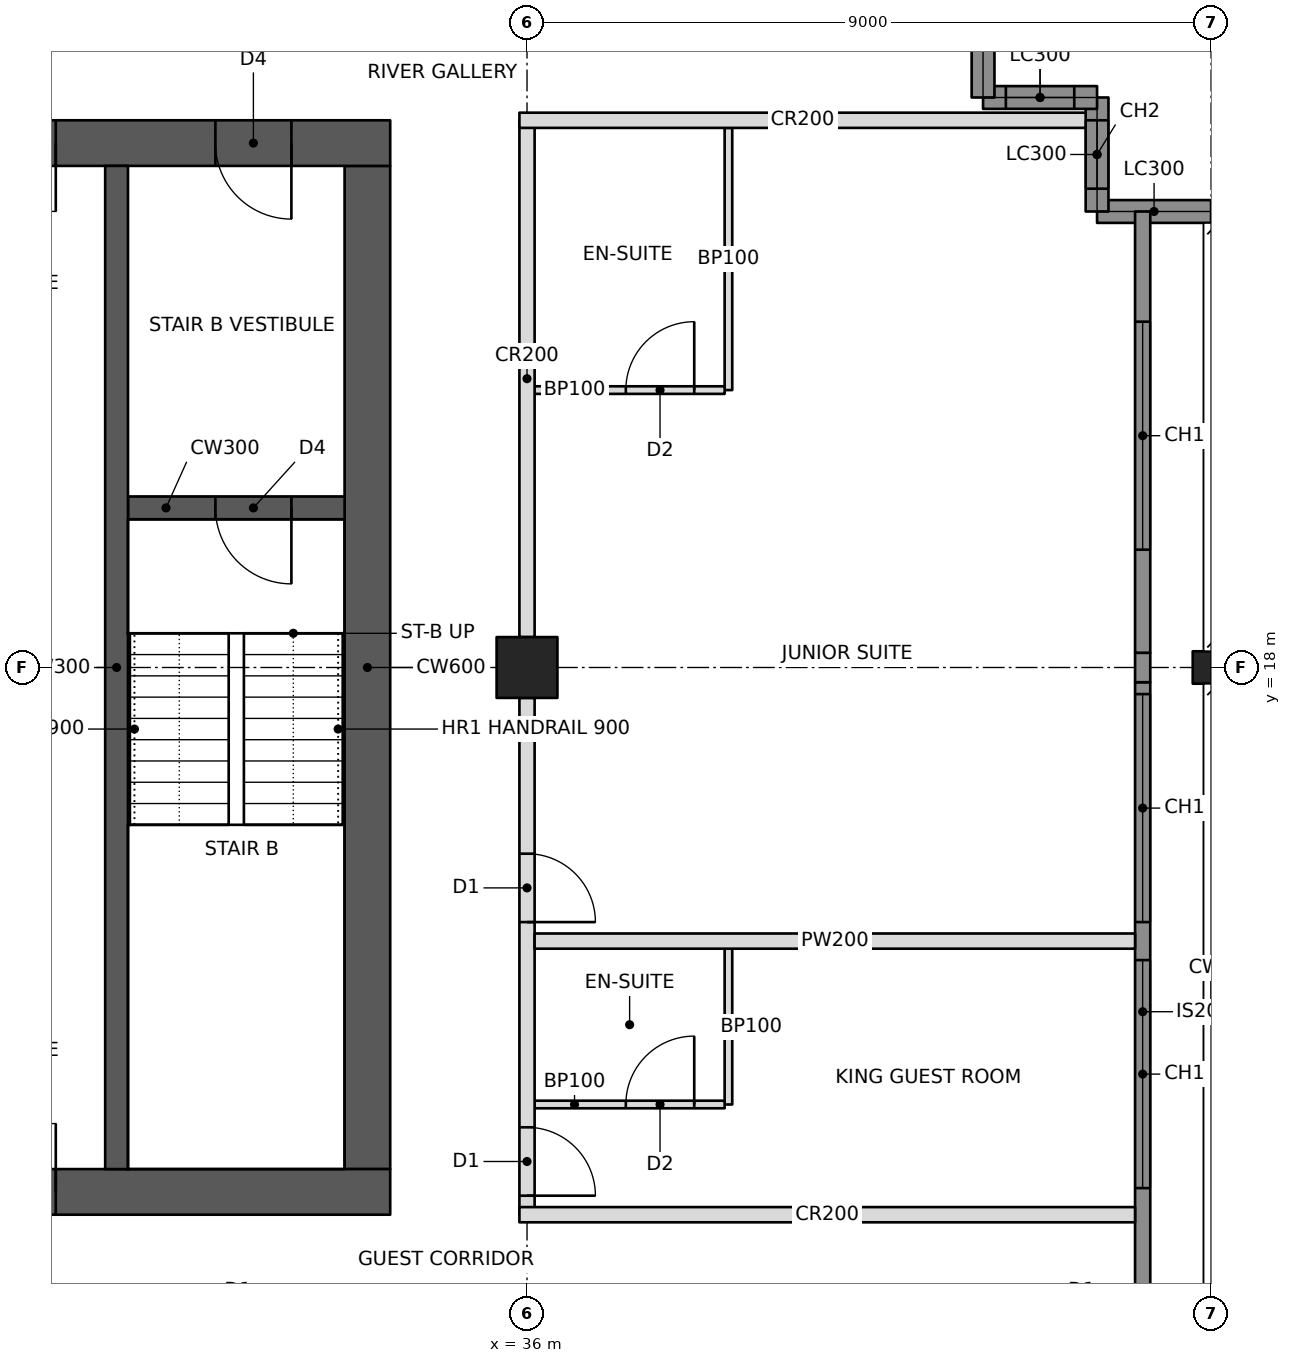
"""IFC4 building model, lengths in metres.
Left out: names, types, materials, properties, quantities, classifications, styles, units other than length and angle.
Written with IfcOpenShell. Run it as: python <this file> out.ifc"""

import sys

from ifc_helpers import new_model, si_unit, direction, frame, frame_2d, origin, origin_2d, place, context, subcontext, project, spatial, rectangle, hollow_rectangle, i_section, extrude, element, fill, save


model = new_model("IFC4")
c1 = context("Model", 3, precision=1e-05, world=origin(), true_north=direction((0.0, 1.0)))
c2 = subcontext(c1, "Body", "Model", "MODEL_VIEW")
j1 = project(units=[si_unit("LENGTHUNIT", "METRE"), si_unit("PLANEANGLEUNIT", "RADIAN")], contexts=[c1])
p1 = place(None, origin())
s1 = spatial("IfcSite", under=j1, at=p1, CompositionType="ELEMENT")
p2 = place(p1, origin())
s2 = spatial("IfcBuilding", under=s1, at=p2, CompositionType="ELEMENT")
p3 = place(p2, frame((0.0, 0.0, 204.6)))
s3 = spatial("IfcBuildingStorey", under=s2, at=p3, CompositionType="ELEMENT", Elevation=204.6)
p4 = place(p3, frame((36.0, 18.0, 0.0), z_axis=(0.0, 0.0, 1.0), x_axis=(0.0, 1.0, 0.0)))
e1 = element("IfcColumn", 1, at=p4, inside=s3, PredefinedType="COLUMN", context=c2, shape_type="SweptSolid", body=[
    extrude(hollow_rectangle(XDim=0.8, YDim=0.8, WallThickness=0.05, at=origin_2d()), origin(), (0.0, 0.0, 1.0), 3.4),
])
p5 = place(p3, frame((45.0, 18.0, 0.0), z_axis=(0.0, 0.0, 1.0), x_axis=(0.0, 1.0, 0.0)))
e2 = element("IfcColumn", 2, at=p5, inside=s3, PredefinedType="COLUMN", context=c2, shape_type="SweptSolid", body=[
    extrude(i_section(OverallWidth=0.427, OverallDepth=0.483, WebThickness=0.051, FlangeThickness=0.082, at=origin_2d()), origin(), (0.0, 0.0, 1.0), 3.4),
])
p6 = place(p3, frame((10.8, 11.1, 0.0), z_axis=(0.0, 0.0, 1.0), x_axis=(1.0, 0.0, 0.0)))
e3 = element("IfcWall", 3, at=p6, inside=s3, PredefinedType="SHEAR", context=c2, shape_type="SweptSolid", body=[
    extrude(rectangle(XDim=23.4, YDim=0.6, at=frame_2d((11.7, 0.0))), origin(), (0.0, 0.0, 1.0), 3.4),
])
p7 = place(p6, frame((1.0, 0.0, 0.0)))
e4 = element("IfcOpeningElement", 4, at=p7, cuts=e3, PredefinedType="OPENING", context=c2, shape_type="SweptSolid", body=[
    extrude(rectangle(XDim=1.0, YDim=2.1, at=frame_2d((0.5, 1.05))), frame((0.0, 0.31, 0.0), z_axis=(0.0, -1.0, 0.0), x_axis=(1.0, 0.0, 0.0)), (0.0, 0.0, 1.0), 0.62),
])
p8 = place(p6, frame((17.2, 0.0, 0.0)))
e5 = element("IfcOpeningElement", 5, at=p8, cuts=e3, PredefinedType="OPENING", context=c2, shape_type="SweptSolid", body=[
    extrude(rectangle(XDim=1.8, YDim=2.1, at=frame_2d((0.9, 1.05))), frame((0.0, 0.31, 0.0), z_axis=(0.0, -1.0, 0.0), x_axis=(1.0, 0.0, 0.0)), (0.0, 0.0, 1.0), 0.62),
])
p9 = place(p3, frame((10.8, 24.9, 0.0), z_axis=(0.0, 0.0, 1.0), x_axis=(1.0, 0.0, 0.0)))
e6 = element("IfcWall", 6, at=p9, inside=s3, PredefinedType="SHEAR", context=c2, shape_type="SweptSolid", body=[
    extrude(rectangle(XDim=23.4, YDim=0.6, at=frame_2d((11.7, 0.0))), origin(), (0.0, 0.0, 1.0), 3.4),
])
p10 = place(p9, frame((17.2, 0.0, 0.0)))
e7 = element("IfcOpeningElement", 7, at=p10, cuts=e6, PredefinedType="OPENING", context=c2, shape_type="SweptSolid", body=[
    extrude(rectangle(XDim=1.8, YDim=2.1, at=frame_2d((0.9, 1.05))), frame((0.0, 0.31, 0.0), z_axis=(0.0, -1.0, 0.0), x_axis=(1.0, 0.0, 0.0)), (0.0, 0.0, 1.0), 0.62),
])
p11 = place(p9, frame((21.1, 0.0, 0.0)))
e8 = element("IfcOpeningElement", 8, at=p11, cuts=e6, PredefinedType="OPENING", context=c2, shape_type="SweptSolid", body=[
    extrude(rectangle(XDim=1.0, YDim=2.1, at=frame_2d((0.5, 1.05))), frame((0.0, 0.31, 0.0), z_axis=(0.0, -1.0, 0.0), x_axis=(1.0, 0.0, 0.0)), (0.0, 0.0, 1.0), 0.62),
])
p12 = place(p9, frame((4.9, 0.0, 0.0)))
e9 = element("IfcOpeningElement", 9, at=p12, cuts=e6, PredefinedType="OPENING", context=c2, shape_type="SweptSolid", body=[
    extrude(rectangle(XDim=1.0, YDim=2.1, at=frame_2d((0.5, 1.05))), frame((0.0, 0.31, 0.0), z_axis=(0.0, -1.0, 0.0), x_axis=(1.0, 0.0, 0.0)), (0.0, 0.0, 1.0), 0.62),
])
p13 = place(p3, frame((33.9, 11.4, 0.0), z_axis=(0.0, 0.0, 1.0), x_axis=(0.0, 1.0, 0.0)))
e10 = element("IfcWall", 10, at=p13, inside=s3, PredefinedType="SHEAR", context=c2, shape_type="SweptSolid", body=[
    extrude(rectangle(XDim=13.2, YDim=0.6, at=frame_2d((6.6, 0.0))), origin(), (0.0, 0.0, 1.0), 3.4),
])
p14 = place(p3, frame((30.6, 11.4, 0.0), z_axis=(0.0, 0.0, 1.0), x_axis=(0.0, 1.0, 0.0)))
e11 = element("IfcWall", 11, at=p14, inside=s3, PredefinedType="SHEAR", context=c2, shape_type="SweptSolid", body=[
    extrude(rectangle(XDim=13.2, YDim=0.3, at=frame_2d((6.6, 0.0))), origin(), (0.0, 0.0, 1.0), 3.4),
])
p15 = place(p3, frame((30.75, 20.1, 0.0), z_axis=(0.0, 0.0, 1.0), x_axis=(1.0, 0.0, 0.0)))
e12 = element("IfcWall", 12, at=p15, inside=s3, PredefinedType="SHEAR", context=c2, shape_type="SweptSolid", body=[
    extrude(rectangle(XDim=2.85, YDim=0.3, at=frame_2d((1.425, 0.0))), origin(), (0.0, 0.0, 1.0), 3.4),
])
p16 = place(p15, frame((1.15, 0.0, 0.0)))
e13 = element("IfcOpeningElement", 13, at=p16, cuts=e12, PredefinedType="OPENING", context=c2, shape_type="SweptSolid", body=[
    extrude(rectangle(XDim=1.0, YDim=2.1, at=frame_2d((0.5, 1.05))), frame((0.0, 0.16, 0.0), z_axis=(0.0, -1.0, 0.0), x_axis=(1.0, 0.0, 0.0)), (0.0, 0.0, 1.0), 0.32),
])
p17 = place(p3, frame((45.0, 24.0, 0.0), z_axis=(0.0, 0.0, 1.0), x_axis=(-1.0, 0.0, 0.0)))
e14 = element("IfcWall", 14, at=p17, inside=s3, PredefinedType="SOLIDWALL", context=c2, shape_type="SweptSolid", body=[
    extrude(rectangle(XDim=1.5, YDim=0.3, at=frame_2d((0.75, 0.0))), origin(), (0.0, 0.0, 1.0), 2.42),
])
p18 = place(p3, frame((43.5, 24.0, 0.0), z_axis=(0.0, 0.0, 1.0), x_axis=(0.0, 1.0, 0.0)))
e15 = element("IfcWall", 15, at=p18, inside=s3, PredefinedType="SOLIDWALL", context=c2, shape_type="SweptSolid", body=[
    extrude(rectangle(XDim=1.5, YDim=0.3, at=frame_2d((0.75, 0.0))), origin(), (0.0, 0.0, 1.0), 3.2),
])
p19 = place(p18, frame((0.3, 0.0, 0.6)))
e16 = element("IfcOpeningElement", 16, at=p19, cuts=e15, PredefinedType="OPENING", context=c2, shape_type="SweptSolid", body=[
    extrude(rectangle(XDim=0.9, YDim=2.2, at=frame_2d((0.45, 1.1))), frame((0.0, 0.16, 0.0), z_axis=(0.0, -1.0, 0.0), x_axis=(1.0, 0.0, 0.0)), (0.0, 0.0, 1.0), 0.32),
])
p20 = place(p3, frame((43.5, 25.5, 0.0), z_axis=(0.0, 0.0, 1.0), x_axis=(-1.0, 0.0, 0.0)))
e17 = element("IfcWall", 17, at=p20, inside=s3, PredefinedType="SOLIDWALL", context=c2, shape_type="SweptSolid", body=[
    extrude(rectangle(XDim=1.5, YDim=0.3, at=frame_2d((0.75, 0.0))), origin(), (0.0, 0.0, 1.0), 3.2),
])
p21 = place(p20, frame((0.3, 0.0, 0.6)))
e18 = element("IfcOpeningElement", 18, at=p21, cuts=e17, PredefinedType="OPENING", context=c2, shape_type="SweptSolid", body=[
    extrude(rectangle(XDim=0.9, YDim=2.2, at=frame_2d((0.45, 1.1))), frame((0.0, 0.16, 0.0), z_axis=(0.0, -1.0, 0.0), x_axis=(1.0, 0.0, 0.0)), (0.0, 0.0, 1.0), 0.32),
])
p22 = place(p3, frame((42.0, 25.5, 0.0), z_axis=(0.0, 0.0, 1.0), x_axis=(0.0, 1.0, 0.0)))
e19 = element("IfcWall", 19, at=p22, inside=s3, PredefinedType="SOLIDWALL", context=c2, shape_type="SweptSolid", body=[
    extrude(rectangle(XDim=1.5, YDim=0.3, at=frame_2d((0.75, 0.0))), origin(), (0.0, 0.0, 1.0), 2.42),
])
p23 = place(p3, frame((36.0, 10.8, 0.0), z_axis=(0.0, 0.0, 1.0), x_axis=(0.0, 1.0, 0.0)))
e20 = element("IfcWall", 20, at=p23, inside=s3, PredefinedType="PARTITIONING", context=c2, shape_type="SweptSolid", body=[
    extrude(rectangle(XDim=6.8, YDim=0.2, at=frame_2d((3.4, 0.0))), origin(), (0.0, 0.0, 1.0), 2.405),
])
p24 = place(p23, frame((0.25, 0.0, 0.0)))
e21 = element("IfcOpeningElement", 21, at=p24, cuts=e20, PredefinedType="OPENING", context=c2, shape_type="SweptSolid", body=[
    extrude(rectangle(XDim=0.9, YDim=2.1, at=frame_2d((0.45, 1.05))), frame((0.0, 0.11, 0.0), z_axis=(0.0, -1.0, 0.0), x_axis=(1.0, 0.0, 0.0)), (0.0, 0.0, 1.0), 0.22),
])
p25 = place(p23, frame((3.85, 0.0, 0.0)))
e22 = element("IfcOpeningElement", 22, at=p25, cuts=e20, PredefinedType="OPENING", context=c2, shape_type="SweptSolid", body=[
    extrude(rectangle(XDim=0.9, YDim=2.1, at=frame_2d((0.45, 1.05))), frame((0.0, 0.11, 0.0), z_axis=(0.0, -1.0, 0.0), x_axis=(1.0, 0.0, 0.0)), (0.0, 0.0, 1.0), 0.22),
])
p26 = place(p3, frame((36.0, 18.4, 0.0), z_axis=(0.0, 0.0, 1.0), x_axis=(0.0, 1.0, 0.0)))
e23 = element("IfcWall", 23, at=p26, inside=s3, PredefinedType="PARTITIONING", context=c2, shape_type="SweptSolid", body=[
    extrude(rectangle(XDim=6.8, YDim=0.2, at=frame_2d((3.4, 0.0))), origin(), (0.0, 0.0, 1.0), 2.405),
])
p27 = place(p3, frame((35.9, 10.8, 0.0), z_axis=(0.0, 0.0, 1.0), x_axis=(1.0, 0.0, 0.0)))
e24 = element("IfcWall", 24, at=p27, inside=s3, PredefinedType="PARTITIONING", context=c2, shape_type="SweptSolid", body=[
    extrude(rectangle(XDim=8.1, YDim=0.2, at=frame_2d((4.05, 0.0))), origin(), (0.0, 0.0, 1.0), 2.404),
])
p28 = place(p3, frame((35.9, 25.2, 0.0), z_axis=(0.0, 0.0, 1.0), x_axis=(1.0, 0.0, 0.0)))
e25 = element("IfcWall", 25, at=p28, inside=s3, PredefinedType="PARTITIONING", context=c2, shape_type="SweptSolid", body=[
    extrude(rectangle(XDim=7.45, YDim=0.2, at=frame_2d((3.725, 0.0))), origin(), (0.0, 0.0, 1.0), 2.404),
])
p29 = place(p3, frame((36.1, 14.4, 0.0), z_axis=(0.0, 0.0, 1.0), x_axis=(1.0, 0.0, 0.0)))
e26 = element("IfcWall", 26, at=p29, inside=s3, PredefinedType="PARTITIONING", context=c2, shape_type="SweptSolid", body=[
    extrude(rectangle(XDim=7.9, YDim=0.2, at=frame_2d((3.95, 0.0))), origin(), (0.0, 0.0, 1.0), 2.404),
])
p30 = place(p3, frame((38.65, 12.25, 0.0), z_axis=(0.0, 0.0, 1.0), x_axis=(0.0, 1.0, 0.0)))
e27 = element("IfcWall", 27, at=p30, inside=s3, PredefinedType="PARTITIONING", context=c2, shape_type="SweptSolid", body=[
    extrude(rectangle(XDim=2.05, YDim=0.1, at=frame_2d((1.025, 0.0))), origin(), (0.0, 0.0, 1.0), 3.2),
])
p31 = place(p3, frame((36.1, 12.25, 0.0), z_axis=(0.0, 0.0, 1.0), x_axis=(1.0, 0.0, 0.0)))
e28 = element("IfcWall", 28, at=p31, inside=s3, PredefinedType="PARTITIONING", context=c2, shape_type="SweptSolid", body=[
    extrude(rectangle(XDim=2.5, YDim=0.1, at=frame_2d((1.25, 0.0))), origin(), (0.0, 0.0, 1.0), 2.404),
])
p32 = place(p31, frame((1.2, 0.0, 0.0)))
e29 = element("IfcOpeningElement", 29, at=p32, cuts=e28, PredefinedType="OPENING", context=c2, shape_type="SweptSolid", body=[
    extrude(rectangle(XDim=0.9, YDim=2.1, at=frame_2d((0.45, 1.05))), frame((0.0, 0.06, 0.0), z_axis=(0.0, -1.0, 0.0), x_axis=(1.0, 0.0, 0.0)), (0.0, 0.0, 1.0), 0.12),
])
p33 = place(p3, frame((38.65, 21.65, 0.0), z_axis=(0.0, 0.0, 1.0), x_axis=(0.0, 1.0, 0.0)))
e30 = element("IfcWall", 30, at=p33, inside=s3, PredefinedType="PARTITIONING", context=c2, shape_type="SweptSolid", body=[
    extrude(rectangle(XDim=3.45, YDim=0.1, at=frame_2d((1.725, 0.0))), origin(), (0.0, 0.0, 1.0), 3.2),
])
p34 = place(p3, frame((36.1, 21.65, 0.0), z_axis=(0.0, 0.0, 1.0), x_axis=(1.0, 0.0, 0.0)))
e31 = element("IfcWall", 31, at=p34, inside=s3, PredefinedType="PARTITIONING", context=c2, shape_type="SweptSolid", body=[
    extrude(rectangle(XDim=2.5, YDim=0.1, at=frame_2d((1.25, 0.0))), origin(), (0.0, 0.0, 1.0), 2.404),
])
p35 = place(p34, frame((1.2, 0.0, 0.0)))
e32 = element("IfcOpeningElement", 32, at=p35, cuts=e31, PredefinedType="OPENING", context=c2, shape_type="SweptSolid", body=[
    extrude(rectangle(XDim=0.9, YDim=2.1, at=frame_2d((0.45, 1.05))), frame((0.0, 0.06, 0.0), z_axis=(0.0, -1.0, 0.0), x_axis=(1.0, 0.0, 0.0)), (0.0, 0.0, 1.0), 0.12),
])
p36 = place(p3, frame((44.1, 9.135, 0.0), z_axis=(0.0, 0.0, 1.0), x_axis=(0.0, 1.0, 0.0)))
e33 = element("IfcWall", 33, at=p36, inside=s3, PredefinedType="SOLIDWALL", context=c2, shape_type="SweptSolid", body=[
    extrude(rectangle(XDim=8.671, YDim=0.2, at=frame_2d((4.335, 0.0))), origin(), (0.0, 0.0, 1.0), 3.2),
])
p37 = place(p36, frame((2.015, 0.0, 0.6)))
e34 = element("IfcOpeningElement", 34, at=p37, cuts=e33, PredefinedType="OPENING", context=c2, shape_type="SweptSolid", body=[
    extrude(rectangle(XDim=3.0, YDim=2.2, at=frame_2d((1.5, 1.1))), frame((0.0, 0.11, 0.0), z_axis=(0.0, -1.0, 0.0), x_axis=(1.0, 0.0, 0.0)), (0.0, 0.0, 1.0), 0.22),
])
p38 = place(p36, frame((5.515, 0.0, 0.6)))
e35 = element("IfcOpeningElement", 35, at=p38, cuts=e33, PredefinedType="OPENING", context=c2, shape_type="SweptSolid", body=[
    extrude(rectangle(XDim=3.0, YDim=2.2, at=frame_2d((1.5, 1.1))), frame((0.0, 0.11, 0.0), z_axis=(0.0, -1.0, 0.0), x_axis=(1.0, 0.0, 0.0)), (0.0, 0.0, 1.0), 0.22),
])
p39 = place(p3, frame((44.1, 17.806, 0.0), z_axis=(0.0, 0.0, 1.0), x_axis=(0.0, 1.0, 0.0)))
e36 = element("IfcWall", 36, at=p39, inside=s3, PredefinedType="SOLIDWALL", context=c2, shape_type="SweptSolid", body=[
    extrude(rectangle(XDim=0.388, YDim=0.2, at=frame_2d((0.194, 0.0))), origin(), (0.0, 0.0, 1.0), 2.404),
])
p40 = place(p3, frame((44.1, 18.194, 0.0), z_axis=(0.0, 0.0, 1.0), x_axis=(0.0, 1.0, 0.0)))
e37 = element("IfcWall", 37, at=p40, inside=s3, PredefinedType="SOLIDWALL", context=c2, shape_type="SweptSolid", body=[
    extrude(rectangle(XDim=5.806, YDim=0.2, at=frame_2d((2.903, 0.0))), origin(), (0.0, 0.0, 1.0), 3.2),
])
p41 = place(p40, frame((1.356, 0.0, 0.6)))
e38 = element("IfcOpeningElement", 38, at=p41, cuts=e37, PredefinedType="OPENING", context=c2, shape_type="SweptSolid", body=[
    extrude(rectangle(XDim=3.0, YDim=2.2, at=frame_2d((1.5, 1.1))), frame((0.0, 0.11, 0.0), z_axis=(0.0, -1.0, 0.0), x_axis=(1.0, 0.0, 0.0)), (0.0, 0.0, 1.0), 0.22),
])
p42 = place(p19, origin())
e39 = element("IfcWindow", 39, at=p42, inside=s3, PartitioningType="SINGLE_PANEL", PredefinedType="WINDOW", context=c2, shape_type="SweptSolid", body=[
    extrude(rectangle(XDim=0.9, YDim=2.2, at=frame_2d((0.45, 1.1))), frame((0.0, 0.03, 0.0), z_axis=(0.0, -1.0, 0.0), x_axis=(1.0, 0.0, 0.0)), (0.0, 0.0, 1.0), 0.06),
])
fill(e16, e39)
p43 = place(p21, origin())
e40 = element("IfcWindow", 40, at=p43, inside=s3, PartitioningType="SINGLE_PANEL", PredefinedType="WINDOW", context=c2, shape_type="SweptSolid", body=[
    extrude(rectangle(XDim=0.9, YDim=2.2, at=frame_2d((0.45, 1.1))), frame((0.0, 0.03, 0.0), z_axis=(0.0, -1.0, 0.0), x_axis=(1.0, 0.0, 0.0)), (0.0, 0.0, 1.0), 0.06),
])
fill(e18, e40)
p44 = place(p37, origin())
e41 = element("IfcWindow", 41, at=p44, inside=s3, PartitioningType="TRIPLE_PANEL_VERTICAL", PredefinedType="WINDOW", context=c2, shape_type="SweptSolid", body=[
    extrude(rectangle(XDim=3.0, YDim=2.2, at=frame_2d((1.5, 1.1))), frame((0.0, 0.03, 0.0), z_axis=(0.0, -1.0, 0.0), x_axis=(1.0, 0.0, 0.0)), (0.0, 0.0, 1.0), 0.06),
])
fill(e34, e41)
p45 = place(p38, origin())
e42 = element("IfcWindow", 42, at=p45, inside=s3, PartitioningType="TRIPLE_PANEL_VERTICAL", PredefinedType="WINDOW", context=c2, shape_type="SweptSolid", body=[
    extrude(rectangle(XDim=3.0, YDim=2.2, at=frame_2d((1.5, 1.1))), frame((0.0, 0.03, 0.0), z_axis=(0.0, -1.0, 0.0), x_axis=(1.0, 0.0, 0.0)), (0.0, 0.0, 1.0), 0.06),
])
fill(e35, e42)
p46 = place(p41, origin())
e43 = element("IfcWindow", 43, at=p46, inside=s3, PartitioningType="TRIPLE_PANEL_VERTICAL", PredefinedType="WINDOW", context=c2, shape_type="SweptSolid", body=[
    extrude(rectangle(XDim=3.0, YDim=2.2, at=frame_2d((1.5, 1.1))), frame((0.0, 0.03, 0.0), z_axis=(0.0, -1.0, 0.0), x_axis=(1.0, 0.0, 0.0)), (0.0, 0.0, 1.0), 0.06),
])
fill(e38, e43)
p47 = place(p32, origin())
e44 = element("IfcDoor", 44, at=p47, inside=s3, OperationType="SINGLE_SWING_RIGHT", PredefinedType="DOOR", context=c2, shape_type="SweptSolid", body=[
    extrude(rectangle(XDim=0.9, YDim=2.1, at=frame_2d((0.45, 1.05))), frame((0.0, 0.025, 0.0), z_axis=(0.0, -1.0, 0.0), x_axis=(1.0, 0.0, 0.0)), (0.0, 0.0, 1.0), 0.05),
])
fill(e29, e44)
p48 = place(p24, frame((0.9, 0.0, 0.0), z_axis=(0.0, 0.0, 1.0), x_axis=(-1.0, 0.0, 0.0)))
e45 = element("IfcDoor", 45, at=p48, inside=s3, OperationType="SINGLE_SWING_RIGHT", PredefinedType="DOOR", context=c2, shape_type="SweptSolid", body=[
    extrude(rectangle(XDim=0.9, YDim=2.1, at=frame_2d((0.45, 1.05))), frame((0.0, 0.025, 0.0), z_axis=(0.0, -1.0, 0.0), x_axis=(1.0, 0.0, 0.0)), (0.0, 0.0, 1.0), 0.05),
])
fill(e21, e45)
p49 = place(p35, origin())
e46 = element("IfcDoor", 46, at=p49, inside=s3, OperationType="SINGLE_SWING_RIGHT", PredefinedType="DOOR", context=c2, shape_type="SweptSolid", body=[
    extrude(rectangle(XDim=0.9, YDim=2.1, at=frame_2d((0.45, 1.05))), frame((0.0, 0.025, 0.0), z_axis=(0.0, -1.0, 0.0), x_axis=(1.0, 0.0, 0.0)), (0.0, 0.0, 1.0), 0.05),
])
fill(e32, e46)
p50 = place(p25, frame((0.9, 0.0, 0.0), z_axis=(0.0, 0.0, 1.0), x_axis=(-1.0, 0.0, 0.0)))
e47 = element("IfcDoor", 47, at=p50, inside=s3, OperationType="SINGLE_SWING_RIGHT", PredefinedType="DOOR", context=c2, shape_type="SweptSolid", body=[
    extrude(rectangle(XDim=0.9, YDim=2.1, at=frame_2d((0.45, 1.05))), frame((0.0, 0.025, 0.0), z_axis=(0.0, -1.0, 0.0), x_axis=(1.0, 0.0, 0.0)), (0.0, 0.0, 1.0), 0.05),
])
fill(e22, e47)
p51 = place(p8, origin())
e48 = element("IfcDoor", 48, at=p51, inside=s3, OperationType="DOUBLE_DOOR_SINGLE_SWING", PredefinedType="DOOR", context=c2, shape_type="SweptSolid", body=[
    extrude(rectangle(XDim=1.8, YDim=2.1, at=frame_2d((0.9, 1.05))), frame((0.0, 0.025, 0.0), z_axis=(0.0, -1.0, 0.0), x_axis=(1.0, 0.0, 0.0)), (0.0, 0.0, 1.0), 0.05),
])
fill(e5, e48)
p52 = place(p10, frame((1.8, 0.0, 0.0), z_axis=(0.0, 0.0, 1.0), x_axis=(-1.0, 0.0, 0.0)))
e49 = element("IfcDoor", 49, at=p52, inside=s3, OperationType="DOUBLE_DOOR_SINGLE_SWING", PredefinedType="DOOR", context=c2, shape_type="SweptSolid", body=[
    extrude(rectangle(XDim=1.8, YDim=2.1, at=frame_2d((0.9, 1.05))), frame((0.0, 0.025, 0.0), z_axis=(0.0, -1.0, 0.0), x_axis=(1.0, 0.0, 0.0)), (0.0, 0.0, 1.0), 0.05),
])
fill(e7, e49)
p53 = place(p11, frame((1.0, 0.0, 0.0), z_axis=(0.0, 0.0, 1.0), x_axis=(-1.0, 0.0, 0.0)))
e50 = element("IfcDoor", 50, at=p53, inside=s3, OperationType="SINGLE_SWING_LEFT", PredefinedType="DOOR", context=c2, shape_type="SweptSolid", body=[
    extrude(rectangle(XDim=1.0, YDim=2.1, at=frame_2d((0.5, 1.05))), frame((0.0, 0.025, 0.0), z_axis=(0.0, -1.0, 0.0), x_axis=(1.0, 0.0, 0.0)), (0.0, 0.0, 1.0), 0.05),
])
fill(e8, e50)
p54 = place(p16, frame((1.0, 0.0, 0.0), z_axis=(0.0, 0.0, 1.0), x_axis=(-1.0, 0.0, 0.0)))
e51 = element("IfcDoor", 51, at=p54, inside=s3, OperationType="SINGLE_SWING_LEFT", PredefinedType="DOOR", context=c2, shape_type="SweptSolid", body=[
    extrude(rectangle(XDim=1.0, YDim=2.1, at=frame_2d((0.5, 1.05))), frame((0.0, 0.025, 0.0), z_axis=(0.0, -1.0, 0.0), x_axis=(1.0, 0.0, 0.0)), (0.0, 0.0, 1.0), 0.05),
])
fill(e13, e51)
save(model, sys.argv[1])
